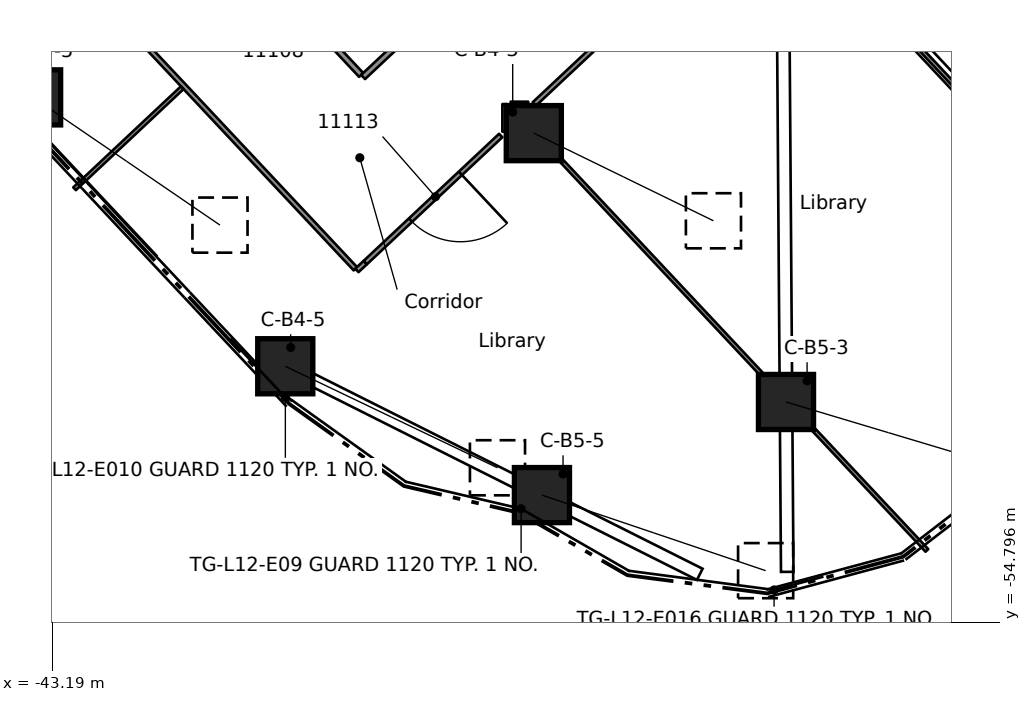
"""IFC4 building model, lengths in metres.
Left out: names, types, materials, properties, quantities, classifications, styles, units other than length and angle.
Written with IfcOpenShell. Run it as: python <this file> out.ifc"""

import sys

from ifc_helpers import new_model, si_unit, direction, frame, frame_2d, origin, origin_2d, place, context, subcontext, project, spatial, rectangle, extrude, element, fill, save


model = new_model("IFC4")
c1 = context("Model", 3, precision=1e-05, world=origin(), true_north=direction((0.0, 1.0)))
c2 = subcontext(c1, "Body", "Model", "MODEL_VIEW")
j1 = project(units=[si_unit("LENGTHUNIT", "METRE"), si_unit("PLANEANGLEUNIT", "RADIAN")], contexts=[c1])
p1 = place(None, origin())
s1 = spatial("IfcSite", under=j1, at=p1, CompositionType="ELEMENT")
p2 = place(p1, origin())
s2 = spatial("IfcBuilding", under=s1, at=p2, CompositionType="ELEMENT")
p3 = place(p2, frame((0.0, 0.0, 54.8)))
s3 = spatial("IfcBuildingStorey", under=s2, at=p3, CompositionType="ELEMENT", Elevation=54.8)
p4 = place(p3, frame((-43.689, -40.979, 0.661), z_axis=(0.753034303778, -0.514645713866, 0.409974543762), x_axis=(0.564244519655, 0.825607728912, 0.0)))
e1 = element("IfcColumn", 1, at=p4, inside=s3, PredefinedType="COLUMN", context=c2, shape_type="SweptSolid", body=[
    extrude(rectangle(XDim=1.45, YDim=1.45, at=origin_2d()), origin(), (0.0, 0.0, 1.0), 6.531),
])
p5 = place(p3, frame((-30.513, -41.92, 0.644), z_axis=(0.798859330442, -0.389733768999, 0.458182670414), x_axis=(0.438465700067, 0.898747923427, 0.0)))
e2 = element("IfcColumn", 2, at=p5, inside=s3, PredefinedType="COLUMN", context=c2, shape_type="SweptSolid", body=[
    extrude(rectangle(XDim=1.45, YDim=1.45, at=origin_2d()), origin(), (0.0, 0.0, 1.0), 5.917),
])
p6 = place(p3, frame((-37.053, -48.054, 0.666), z_axis=(0.828402754462, -0.396272933568, 0.395874523709), x_axis=(0.43152667224, 0.902100177999, 0.0)))
e3 = element("IfcColumn", 3, at=p6, inside=s3, PredefinedType="COLUMN", context=c2, shape_type="SweptSolid", body=[
    extrude(rectangle(XDim=1.45, YDim=1.45, at=origin_2d()), origin(), (0.0, 0.0, 1.0), 6.741),
])
p7 = place(p3, frame((-23.877, -48.994, 0.654), z_axis=(0.864156879043, -0.25877343513, 0.431589153795), x_axis=(0.286866155461, 0.957970672229, 0.0)))
e4 = element("IfcColumn", 4, at=p7, inside=s3, PredefinedType="COLUMN", context=c2, shape_type="SweptSolid", body=[
    extrude(rectangle(XDim=1.45, YDim=1.45, at=origin_2d()), origin(), (0.0, 0.0, 1.0), 6.237),
])
p8 = place(p3, frame((-30.299, -51.444, 0.666), z_axis=(0.870574615383, -0.29400715577, 0.394537237035), x_axis=(0.319962531243, 0.947430197218, 0.0)))
e5 = element("IfcColumn", 5, at=p8, inside=s3, PredefinedType="COLUMN", context=c2, shape_type="SweptSolid", body=[
    extrude(rectangle(XDim=1.45, YDim=1.45, at=origin_2d()), origin(), (0.0, 0.0, 1.0), 6.761),
])
p9 = place(p3, frame((-35.207, -45.49, 0.0), z_axis=(0.0, 0.0, 1.0), x_axis=(-0.684214039895, 0.72928125412, 0.0)))
e6 = element("IfcWall", 6, at=p9, inside=s3, PredefinedType="PARTITIONING", context=c2, shape_type="SweptSolid", body=[
    extrude(rectangle(XDim=13.18, YDim=0.125, at=frame_2d((6.59, 0.0))), origin(), (0.0, 0.0, 1.0), 3.58),
])
p10 = place(p9, frame((9.443, 0.0, 0.0)))
e7 = element("IfcOpeningElement", 7, at=p10, cuts=e6, PredefinedType="OPENING", context=c2, shape_type="SweptSolid", body=[
    extrude(rectangle(XDim=0.9, YDim=2.1, at=frame_2d((0.45, 1.05))), frame((0.0, 0.073, 0.0), z_axis=(0.0, -1.0, 0.0), x_axis=(1.0, 0.0, 0.0)), (0.0, 0.0, 1.0), 0.145),
])
p11 = place(p3, frame((-39.127, -36.049, 0.0), z_axis=(0.0, 0.0, 1.0), x_axis=(0.684241361078, -0.729255620335, 0.0)))
e8 = element("IfcWall", 8, at=p11, inside=s3, PredefinedType="PARTITIONING", context=c2, shape_type="SweptSolid", body=[
    extrude(rectangle(XDim=5.95, YDim=0.15, at=frame_2d((2.975, 0.0))), origin(), (0.0, 0.0, 1.0), 3.58),
])
p12 = place(p11, frame((2.525, 0.0, 0.0)))
e9 = element("IfcOpeningElement", 9, at=p12, cuts=e8, PredefinedType="OPENING", context=c2, shape_type="SweptSolid", body=[
    extrude(rectangle(XDim=0.9, YDim=2.1, at=frame_2d((0.45, 1.05))), frame((0.0, 0.085, 0.0), z_axis=(0.0, -1.0, 0.0), x_axis=(1.0, 0.0, 0.0)), (0.0, 0.0, 1.0), 0.17),
])
p13 = place(p3, frame((-31.085, -41.261, 0.0), z_axis=(0.0, 0.0, 1.0), x_axis=(0.684092269, -0.729395480857, 0.0)))
e10 = element("IfcWall", 10, at=p13, inside=s3, PredefinedType="PARTITIONING", context=c2, shape_type="SweptSolid", body=[
    extrude(rectangle(XDim=15.957, YDim=0.1, at=frame_2d((7.979, 0.0))), origin(), (0.0, 0.0, 1.0), 3.58),
])
p14 = place(p3, frame((-24.638, -35.126, 0.0), z_axis=(0.0, 0.0, 1.0), x_axis=(0.684140619999, -0.729350129956, 0.0)))
e11 = element("IfcWall", 11, at=p14, inside=s3, PredefinedType="PARTITIONING", context=c2, shape_type="SweptSolid", body=[
    extrude(rectangle(XDim=15.752, YDim=0.1, at=frame_2d((7.876, 0.0))), origin(), (0.0, 0.0, 1.0), 3.58),
])
p15 = place(p3, frame((-31.122, -41.155, 0.0), z_axis=(0.0, 0.0, 1.0), x_axis=(1.0, 0.0, 0.0)))
e12 = element("IfcWall", 12, at=p15, inside=s3, PredefinedType="PARTITIONING", context=c2, shape_type="SweptSolid", body=[
    extrude(rectangle(XDim=0.462, YDim=0.125, at=frame_2d((0.231, 0.0))), origin(), (0.0, 0.0, 1.0), 3.58),
])
p16 = place(p3, frame((-35.168, -45.532, 0.0), z_axis=(0.0, 0.0, 1.0), x_axis=(0.729917735091, 0.683535002761, 0.0)))
e13 = element("IfcWall", 13, at=p16, inside=s3, PredefinedType="PARTITIONING", context=c2, shape_type="SweptSolid", body=[
    extrude(rectangle(XDim=0.3, YDim=0.125, at=frame_2d((0.15, 0.0))), origin(), (0.0, 0.0, 1.0), 3.58),
])
p17 = place(p3, frame((-31.383, -41.982, 0.0), z_axis=(0.0, 0.0, 1.0), x_axis=(-0.729340966423, -0.684150388947, 0.0)))
e14 = element("IfcWall", 14, at=p17, inside=s3, PredefinedType="PARTITIONING", context=c2, shape_type="SweptSolid", body=[
    extrude(rectangle(XDim=4.889, YDim=0.125, at=frame_2d((2.445, 0.0))), origin(), (0.0, 0.0, 1.0), 3.58),
])
p18 = place(p17, frame((1.456, 0.0, 0.0)))
e15 = element("IfcOpeningElement", 15, at=p18, cuts=e14, PredefinedType="OPENING", context=c2, shape_type="SweptSolid", body=[
    extrude(rectangle(XDim=1.8, YDim=2.1, at=frame_2d((0.9, 1.05))), frame((0.0, 0.073, 0.0), z_axis=(0.0, -1.0, 0.0), x_axis=(1.0, 0.0, 0.0)), (0.0, 0.0, 1.0), 0.145),
])
p19 = place(p3, frame((-24.843, -35.848, 0.0), z_axis=(0.0, 0.0, 1.0), x_axis=(-0.729416485857, -0.684069872279, 0.0)))
e16 = element("IfcWall", 16, at=p19, inside=s3, PredefinedType="PARTITIONING", context=c2, shape_type="SweptSolid", body=[
    extrude(rectangle(XDim=7.758, YDim=0.125, at=frame_2d((3.879, 0.0))), origin(), (0.0, 0.0, 1.0), 3.58),
])
p20 = place(p19, frame((2.956, 0.0, 0.0)))
e17 = element("IfcOpeningElement", 17, at=p20, cuts=e16, PredefinedType="OPENING", context=c2, shape_type="SweptSolid", body=[
    extrude(rectangle(XDim=1.8, YDim=2.1, at=frame_2d((0.9, 1.05))), frame((0.0, 0.073, 0.0), z_axis=(0.0, -1.0, 0.0), x_axis=(1.0, 0.0, 0.0)), (0.0, 0.0, 1.0), 0.145),
])
p21 = place(p3, frame((-35.005, -40.443, 0.0), z_axis=(0.0, 0.0, 1.0), x_axis=(0.729361682403, 0.684128303934, 0.0)))
e18 = element("IfcWall", 18, at=p21, inside=s3, PredefinedType="PARTITIONING", context=c2, shape_type="SweptSolid", body=[
    extrude(rectangle(XDim=2.299, YDim=0.15, at=frame_2d((1.15, 0.0))), origin(), (0.0, 0.0, 1.0), 3.58),
])
p22 = place(p3, frame((-42.598, -43.384, 0.0), z_axis=(0.0, 0.0, 1.0), x_axis=(0.729270698329, 0.684225290791, 0.0)))
e19 = element("IfcWall", 19, at=p22, inside=s3, PredefinedType="PARTITIONING", context=c2, shape_type="SweptSolid", body=[
    extrude(rectangle(XDim=3.886, YDim=0.1, at=frame_2d((1.943, 0.0))), origin(), (0.0, 0.0, 1.0), 3.58),
])
p23 = place(p3, frame((-31.278, -41.883, 0.0), z_axis=(0.0, 0.0, 1.0), x_axis=(0.0, 1.0, 0.0)))
e20 = element("IfcWall", 20, at=p23, inside=s3, PredefinedType="PARTITIONING", context=c2, shape_type="SweptSolid", body=[
    extrude(rectangle(XDim=0.728, YDim=0.125, at=frame_2d((0.364, 0.0))), origin(), (0.0, 0.0, 1.0), 3.58),
])
p24 = place(p18, origin())
e21 = element("IfcDoor", 21, at=p24, inside=s3, OperationType="DOUBLE_DOOR_SINGLE_SWING", PredefinedType="DOOR", context=c2, shape_type="SweptSolid", body=[
    extrude(rectangle(XDim=1.8, YDim=2.1, at=frame_2d((0.9, 1.05))), frame((0.0, 0.025, 0.0), z_axis=(0.0, -1.0, 0.0), x_axis=(1.0, 0.0, 0.0)), (0.0, 0.0, 1.0), 0.05),
])
fill(e15, e21)
save(model, sys.argv[1])
